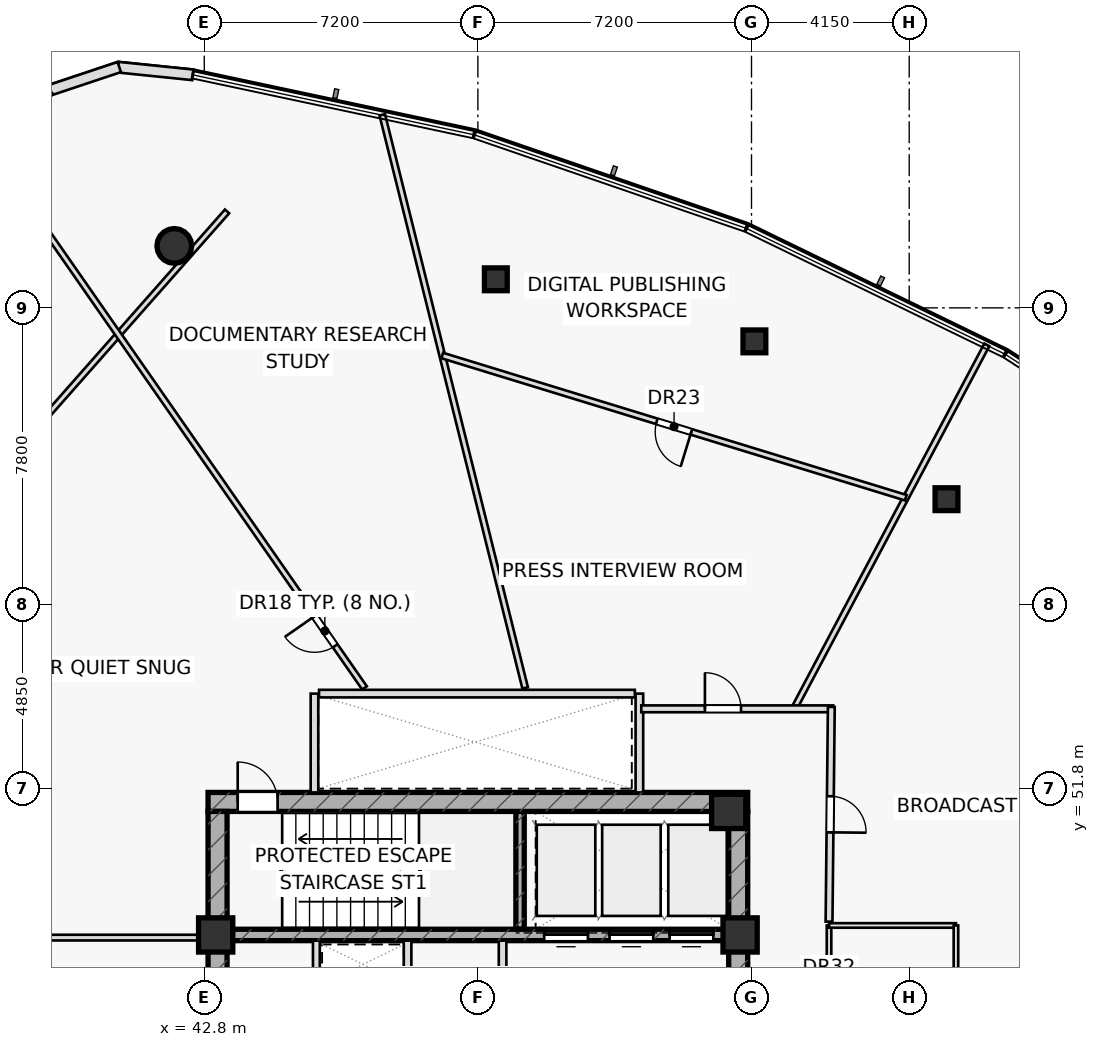
"""IFC4 building model, lengths in metres.
Left out: names, types, materials, properties, quantities, classifications, styles, units other than length and angle.
Written with IfcOpenShell. Run it as: python <this file> out.ifc"""

import sys

from ifc_helpers import new_model, si_unit, direction, frame, frame_2d, origin, origin_2d, place, context, subcontext, project, spatial, rectangle, hollow_rectangle, hollow_circle, extrude, element, fill, save


model = new_model("IFC4")
c1 = context("Model", 3, precision=1e-05, world=origin(), true_north=direction((0.0, 1.0)))
c2 = subcontext(c1, "Body", "Model", "MODEL_VIEW")
j1 = project(units=[si_unit("LENGTHUNIT", "METRE"), si_unit("PLANEANGLEUNIT", "RADIAN")], contexts=[c1])
p1 = place(None, origin())
s1 = spatial("IfcSite", under=j1, at=p1, CompositionType="ELEMENT")
p2 = place(p1, origin())
s2 = spatial("IfcBuilding", under=s1, at=p2, CompositionType="ELEMENT")
p3 = place(p2, frame((0.0, 0.0, 161.8)))
s3 = spatial("IfcBuildingStorey", under=s2, at=p3, CompositionType="ELEMENT", Elevation=161.8)
p4 = place(p3, frame((51.11, 48.1, 0.0), z_axis=(0.0, 0.0, 1.0), x_axis=(0.0, 1.0, 0.0)))
e1 = element("IfcWall", 1, at=p4, inside=s3, PredefinedType="SHEAR", context=c2, shape_type="SweptSolid", body=[
    extrude(rectangle(XDim=3.1, YDim=0.22, at=frame_2d((1.55, 0.0))), origin(), (0.0, 0.0, 1.0), 3.55),
])
p5 = place(p3, frame((42.9, 51.45, 0.0), z_axis=(0.0, 0.0, 1.0), x_axis=(1.0, 0.0, 0.0)))
e2 = element("IfcWall", 2, at=p5, inside=s3, PredefinedType="SHEAR", context=c2, shape_type="SweptSolid", body=[
    extrude(rectangle(XDim=14.2, YDim=0.5, at=frame_2d((7.1, 0.0))), origin(), (0.0, 0.0, 1.0), 3.55),
])
p6 = place(p5, frame((0.78, 0.0, 0.0)))
e3 = element("IfcOpeningElement", 3, at=p6, cuts=e2, PredefinedType="OPENING", context=c2, shape_type="SweptSolid", body=[
    extrude(rectangle(XDim=1.05, YDim=2.2, at=frame_2d((0.525, 1.1))), frame((0.0, 0.26, 0.0), z_axis=(0.0, -1.0, 0.0), x_axis=(1.0, 0.0, 0.0)), (0.0, 0.0, 1.0), 0.52),
])
p7 = place(p3, frame((43.15, 38.8, 0.0), z_axis=(0.0, 0.0, 1.0), x_axis=(0.0, 1.0, 0.0)))
e4 = element("IfcWall", 4, at=p7, inside=s3, PredefinedType="SHEAR", context=c2, shape_type="SweptSolid", body=[
    extrude(rectangle(XDim=12.4, YDim=0.5, at=frame_2d((6.2, 0.0))), origin(), (0.0, 0.0, 1.0), 3.55),
])
p8 = place(p3, frame((56.85, 38.8, 0.0), z_axis=(0.0, 0.0, 1.0), x_axis=(0.0, 1.0, 0.0)))
e5 = element("IfcWall", 5, at=p8, inside=s3, PredefinedType="SHEAR", context=c2, shape_type="SweptSolid", body=[
    extrude(rectangle(XDim=12.4, YDim=0.5, at=frame_2d((6.2, 0.0))), origin(), (0.0, 0.0, 1.0), 3.55),
])
p9 = place(p8, frame((3.85, 0.0, 0.0)))
e6 = element("IfcOpeningElement", 6, at=p9, cuts=e5, PredefinedType="OPENING", context=c2, shape_type="SweptSolid", body=[
    extrude(rectangle(XDim=1.5, YDim=2.2, at=frame_2d((0.75, 1.1))), frame((0.0, 0.26, 0.0), z_axis=(0.0, -1.0, 0.0), x_axis=(1.0, 0.0, 0.0)), (0.0, 0.0, 1.0), 0.52),
])
p10 = place(p3, frame((43.4, 47.95, 0.0), z_axis=(0.0, 0.0, 1.0), x_axis=(1.0, 0.0, 0.0)))
e7 = element("IfcWall", 7, at=p10, inside=s3, PredefinedType="SHEAR", context=c2, shape_type="SweptSolid", body=[
    extrude(rectangle(XDim=13.2, YDim=0.3, at=frame_2d((6.6, 0.0))), origin(), (0.0, 0.0, 1.0), 3.55),
])
p11 = place(p10, frame((8.345, 0.0, 0.0)))
e8 = element("IfcOpeningElement", 8, at=p11, cuts=e7, PredefinedType="OPENING", context=c2, shape_type="SweptSolid", body=[
    extrude(rectangle(XDim=1.15, YDim=2.2, at=frame_2d((0.575, 1.1))), frame((0.0, 0.16, 0.0), z_axis=(0.0, -1.0, 0.0), x_axis=(1.0, 0.0, 0.0)), (0.0, 0.0, 1.0), 0.32),
])
p12 = place(p10, frame((10.065, 0.0, 0.0)))
e9 = element("IfcOpeningElement", 9, at=p12, cuts=e7, PredefinedType="OPENING", context=c2, shape_type="SweptSolid", body=[
    extrude(rectangle(XDim=1.15, YDim=2.2, at=frame_2d((0.575, 1.1))), frame((0.0, 0.16, 0.0), z_axis=(0.0, -1.0, 0.0), x_axis=(1.0, 0.0, 0.0)), (0.0, 0.0, 1.0), 0.32),
])
p13 = place(p10, frame((11.645, 0.0, 0.0)))
e10 = element("IfcOpeningElement", 10, at=p13, cuts=e7, PredefinedType="OPENING", context=c2, shape_type="SweptSolid", body=[
    extrude(rectangle(XDim=1.15, YDim=2.2, at=frame_2d((0.575, 1.1))), frame((0.0, 0.16, 0.0), z_axis=(0.0, -1.0, 0.0), x_axis=(1.0, 0.0, 0.0)), (0.0, 0.0, 1.0), 0.32),
])
for number, where, z_axis, x_axis in (
    (11, (43.1, 47.95, 0.0), (0.0, 0.0, 1.0), (1.0, 0.0, 0.0)),
    (12, (56.9, 47.95, 0.0), (0.0, 0.0, 1.0), (1.0, 0.0, 0.0)),
    (13, (56.6, 51.2, 0.0), (0.0, 0.0, 1.0), (1.0, 0.0, 0.0)),
):
    element("IfcColumn", number, at=place(p3, frame(where, z_axis=z_axis, x_axis=x_axis)), inside=s3, PredefinedType="COLUMN", context=c2, shape_type="SweptSolid", body=[
        extrude(rectangle(XDim=0.9, YDim=0.9, at=origin_2d()), origin(), (0.0, 0.0, 1.0), 3.55),
    ])
p14 = place(p3, frame((42.011, 66.08, 0.0), z_axis=(0.0, 0.0, 1.0), x_axis=(1.0, 0.0, 0.0)))
e14 = element("IfcColumn", 14, at=p14, inside=s3, PredefinedType="COLUMN", context=c2, shape_type="SweptSolid", body=[
    extrude(hollow_circle(Radius=0.457, WallThickness=0.04, at=origin_2d()), origin(), (0.0, 0.0, 1.0), 3.55),
])
for number, where, z_axis, x_axis in (
    (15, (62.331, 59.416, 0.0), (0.0, 0.0, 1.0), (1.0, 0.0, 0.0)),
    (16, (57.277, 63.568, 0.0), (0.0, 0.0, 1.0), (1.0, 0.0, 0.0)),
    (17, (50.472, 65.202, 0.0), (0.0, 0.0, 1.0), (1.0, 0.0, 0.0)),
):
    element("IfcColumn", number, at=place(p3, frame(where, z_axis=z_axis, x_axis=x_axis)), inside=s3, PredefinedType="COLUMN", context=c2, shape_type="SweptSolid", body=[
        extrude(hollow_rectangle(XDim=0.6, YDim=0.6, WallThickness=0.036, at=origin_2d()), origin(), (0.0, 0.0, 1.0), 3.55),
    ])
for number, where, z_axis, x_axis in (
    (18, (45.7, 51.7, 0.0), (0.0, 0.0, 1.0), (0.0, 1.0, 0.0)),
    (19, (54.25, 51.7, 0.0), (0.0, 0.0, 1.0), (0.0, 1.0, 0.0)),
):
    element("IfcWall", number, at=place(p3, frame(where, z_axis=z_axis, x_axis=x_axis)), inside=s3, PredefinedType="PARTITIONING", context=c2, shape_type="SweptSolid", body=[
        extrude(rectangle(XDim=2.6, YDim=0.2, at=frame_2d((1.3, 0.0))), origin(), (0.0, 0.0, 1.0), 3.55),
    ])
p15 = place(p3, frame((48.15, 46.55, 0.0), z_axis=(0.0, 0.0, 1.0), x_axis=(0.0, 1.0, 0.0)))
e20 = element("IfcWall", 20, at=p15, inside=s3, PredefinedType="PARTITIONING", context=c2, shape_type="SweptSolid", body=[
    extrude(rectangle(XDim=1.25, YDim=0.2, at=frame_2d((0.625, 0.0))), origin(), (0.0, 0.0, 1.0), 3.55),
])
p16 = place(p3, frame((50.65, 45.05, 0.0), z_axis=(0.0, 0.0, 1.0), x_axis=(0.0, 1.0, 0.0)))
e21 = element("IfcWall", 21, at=p16, inside=s3, PredefinedType="PARTITIONING", context=c2, shape_type="SweptSolid", body=[
    extrude(rectangle(XDim=2.75, YDim=0.2, at=frame_2d((1.375, 0.0))), origin(), (0.0, 0.0, 1.0), 3.55),
])
p17 = place(p3, frame((45.75, 42.2, 0.0), z_axis=(0.0, 0.0, 1.0), x_axis=(0.0, 1.0, 0.0)))
e22 = element("IfcWall", 22, at=p17, inside=s3, PredefinedType="PARTITIONING", context=c2, shape_type="SweptSolid", body=[
    extrude(rectangle(XDim=5.6, YDim=0.18, at=frame_2d((2.8, 0.0))), origin(), (0.0, 0.0, 1.0), 3.55),
])
p18 = place(p17, frame((0.42, 0.0, 0.0)))
e23 = element("IfcOpeningElement", 23, at=p18, cuts=e22, PredefinedType="OPENING", context=c2, shape_type="SweptSolid", body=[
    extrude(rectangle(XDim=0.85, YDim=2.05, at=frame_2d((0.425, 1.025))), frame((0.0, 0.1, 0.0), z_axis=(0.0, -1.0, 0.0), x_axis=(1.0, 0.0, 0.0)), (0.0, 0.0, 1.0), 0.2),
])
p19 = place(p17, frame((1.57, 0.0, 0.0)))
e24 = element("IfcOpeningElement", 24, at=p19, cuts=e22, PredefinedType="OPENING", context=c2, shape_type="SweptSolid", body=[
    extrude(rectangle(XDim=0.85, YDim=2.05, at=frame_2d((0.425, 1.025))), frame((0.0, 0.1, 0.0), z_axis=(0.0, -1.0, 0.0), x_axis=(1.0, 0.0, 0.0)), (0.0, 0.0, 1.0), 0.2),
])
p20 = place(p17, frame((2.8, 0.0, 0.0)))
e25 = element("IfcOpeningElement", 25, at=p20, cuts=e22, PredefinedType="OPENING", context=c2, shape_type="SweptSolid", body=[
    extrude(rectangle(XDim=0.9, YDim=2.05, at=frame_2d((0.45, 1.025))), frame((0.0, 0.1, 0.0), z_axis=(0.0, -1.0, 0.0), x_axis=(1.0, 0.0, 0.0)), (0.0, 0.0, 1.0), 0.2),
])
p21 = place(p3, frame((43.4, 66.989, 0.0), z_axis=(0.0, 0.0, 1.0), x_axis=(-0.661622343701, -0.749837231881, 0.0)))
e26 = element("IfcWall", 26, at=p21, inside=s3, PredefinedType="PARTITIONING", context=c2, shape_type="SweptSolid", body=[
    extrude(rectangle(XDim=11.427, YDim=0.15, at=frame_2d((5.714, 0.0))), origin(), (0.0, 0.0, 1.0), 2.935),
])
p22 = place(p3, frame((37.14, 47.88, 0.0), z_axis=(0.0, 0.0, 1.0), x_axis=(1.0, 0.0, 0.0)))
e27 = element("IfcWall", 27, at=p22, inside=s3, PredefinedType="PARTITIONING", context=c2, shape_type="SweptSolid", body=[
    extrude(rectangle(XDim=5.76, YDim=0.15, at=frame_2d((2.88, 0.0))), origin(), (0.0, 0.0, 1.0), 2.935),
])
p23 = place(p3, frame((59.24, 41.2, 0.0), z_axis=(0.0, 0.0, 1.0), x_axis=(0.0, 1.0, 0.0)))
e28 = element("IfcWall", 28, at=p23, inside=s3, PredefinedType="PARTITIONING", context=c2, shape_type="SweptSolid", body=[
    extrude(rectangle(XDim=7.0, YDim=0.12, at=frame_2d((3.5, 0.0))), origin(), (0.0, 0.0, 1.0), 3.55),
])
p24 = place(p23, frame((1.15, 0.0, 0.0)))
e29 = element("IfcOpeningElement", 29, at=p24, cuts=e28, PredefinedType="OPENING", context=c2, shape_type="SweptSolid", body=[
    extrude(rectangle(XDim=0.9, YDim=2.05, at=frame_2d((0.45, 1.025))), frame((0.0, 0.07, 0.0), z_axis=(0.0, -1.0, 0.0), x_axis=(1.0, 0.0, 0.0)), (0.0, 0.0, 1.0), 0.14),
])
p25 = place(p23, frame((4.7, 0.0, 0.0)))
e30 = element("IfcOpeningElement", 30, at=p25, cuts=e28, PredefinedType="OPENING", context=c2, shape_type="SweptSolid", body=[
    extrude(rectangle(XDim=0.9, YDim=2.05, at=frame_2d((0.45, 1.025))), frame((0.0, 0.07, 0.0), z_axis=(0.0, -1.0, 0.0), x_axis=(1.0, 0.0, 0.0)), (0.0, 0.0, 1.0), 0.14),
])
p26 = place(p3, frame((59.24, 48.2, 0.0), z_axis=(0.0, 0.0, 1.0), x_axis=(1.0, 0.0, 0.0)))
e31 = element("IfcWall", 31, at=p26, inside=s3, PredefinedType="PARTITIONING", context=c2, shape_type="SweptSolid", body=[
    extrude(rectangle(XDim=3.34, YDim=0.12, at=frame_2d((1.67, 0.0))), origin(), (0.0, 0.0, 1.0), 3.55),
])
p27 = place(p3, frame((62.58, 41.2, 0.0), z_axis=(0.0, 0.0, 1.0), x_axis=(0.0, 1.0, 0.0)))
e32 = element("IfcWall", 32, at=p27, inside=s3, PredefinedType="PARTITIONING", context=c2, shape_type="SweptSolid", body=[
    extrude(rectangle(XDim=7.0, YDim=0.12, at=frame_2d((3.5, 0.0))), origin(), (0.0, 0.0, 1.0), 3.55),
])
p28 = place(p3, frame((51.244, 54.45, 0.0), z_axis=(0.0, 0.0, 1.0), x_axis=(-0.241921992863, 0.970295702025, 0.0)))
e33 = element("IfcWall", 33, at=p28, inside=s3, PredefinedType="PARTITIONING", context=c2, shape_type="SweptSolid", body=[
    extrude(rectangle(XDim=15.541, YDim=0.15, at=frame_2d((7.771, 0.0))), origin(), (0.0, 0.0, 1.0), 3.025),
])
p29 = place(p3, frame((47.017, 54.45, 0.0), z_axis=(0.0, 0.0, 1.0), x_axis=(-0.571606219405, 0.82052807992, 0.0)))
e34 = element("IfcWall", 34, at=p29, inside=s3, PredefinedType="PARTITIONING", context=c2, shape_type="SweptSolid", body=[
    extrude(rectangle(XDim=17.228, YDim=0.15, at=frame_2d((8.614, 0.0))), origin(), (0.0, 0.0, 1.0), 2.935),
])
p30 = place(p29, frame((1.35, 0.0, 0.0)))
e35 = element("IfcOpeningElement", 35, at=p30, cuts=e34, PredefinedType="OPENING", context=c2, shape_type="SweptSolid", body=[
    extrude(rectangle(XDim=0.95, YDim=2.05, at=frame_2d((0.475, 1.025))), frame((0.0, 0.085, 0.0), z_axis=(0.0, -1.0, 0.0), x_axis=(1.0, 0.0, 0.0)), (0.0, 0.0, 1.0), 0.17),
])
p31 = place(p3, frame((62.65, 45.729, 0.0), z_axis=(0.0, 0.0, 1.0), x_axis=(0.99676638327, 0.08035407384, 0.0)))
e36 = element("IfcWall", 36, at=p31, inside=s3, PredefinedType="PARTITIONING", context=c2, shape_type="SweptSolid", body=[
    extrude(rectangle(XDim=19.746, YDim=0.15, at=frame_2d((9.873, 0.0))), origin(), (0.0, 0.0, 1.0), 3.025),
])
p32 = place(p3, frame((58.317, 53.9, 0.0), z_axis=(0.0, 0.0, 1.0), x_axis=(0.468253014178, 0.883594428861, 0.0)))
e37 = element("IfcWall", 37, at=p32, inside=s3, PredefinedType="PARTITIONING", context=c2, shape_type="SweptSolid", body=[
    extrude(rectangle(XDim=10.839, YDim=0.15, at=frame_2d((5.419, 0.0))), origin(), (0.0, 0.0, 1.0), 2.935),
])
p33 = place(p3, frame((61.26, 59.455, 0.0), z_axis=(0.0, 0.0, 1.0), x_axis=(-0.956033107644, 0.293258754496, 0.0)))
e38 = element("IfcWall", 38, at=p33, inside=s3, PredefinedType="PARTITIONING", context=c2, shape_type="SweptSolid", body=[
    extrude(rectangle(XDim=12.758, YDim=0.15, at=frame_2d((6.379, 0.0))), origin(), (0.0, 0.0, 1.0), 2.935),
])
p34 = place(p33, frame((5.904, 0.0, 0.0)))
e39 = element("IfcOpeningElement", 39, at=p34, cuts=e38, PredefinedType="OPENING", context=c2, shape_type="SweptSolid", body=[
    extrude(rectangle(XDim=0.95, YDim=2.05, at=frame_2d((0.475, 1.025))), frame((0.0, 0.085, 0.0), z_axis=(0.0, -1.0, 0.0), x_axis=(1.0, 0.0, 0.0)), (0.0, 0.0, 1.0), 0.17),
])
p35 = place(p3, frame((54.3, 53.9, 0.0), z_axis=(0.0, 0.0, 1.0), x_axis=(1.0, 0.0, 0.0)))
e40 = element("IfcWall", 40, at=p35, inside=s3, PredefinedType="PARTITIONING", context=c2, shape_type="SweptSolid", body=[
    extrude(rectangle(XDim=5.05, YDim=0.18, at=frame_2d((2.525, 0.0))), origin(), (0.0, 0.0, 1.0), 2.935),
])
p36 = place(p35, frame((1.674, 0.0, 0.0)))
e41 = element("IfcOpeningElement", 41, at=p36, cuts=e40, PredefinedType="OPENING", context=c2, shape_type="SweptSolid", body=[
    extrude(rectangle(XDim=0.95, YDim=2.05, at=frame_2d((0.475, 1.025))), frame((0.0, 0.1, 0.0), z_axis=(0.0, -1.0, 0.0), x_axis=(1.0, 0.0, 0.0)), (0.0, 0.0, 1.0), 0.2),
])
p37 = place(p3, frame((59.301, 53.95, 0.0), z_axis=(0.0, 0.0, 1.0), x_axis=(-0.010629422803, -0.99994350609, 0.0)))
e42 = element("IfcWall", 42, at=p37, inside=s3, PredefinedType="PARTITIONING", context=c2, shape_type="SweptSolid", body=[
    extrude(rectangle(XDim=5.65, YDim=0.18, at=frame_2d((2.825, 0.0))), origin(), (0.0, 0.0, 1.0), 2.935),
])
p38 = place(p37, frame((2.35, 0.0, 0.0)))
e43 = element("IfcOpeningElement", 43, at=p38, cuts=e42, PredefinedType="OPENING", context=c2, shape_type="SweptSolid", body=[
    extrude(rectangle(XDim=0.95, YDim=2.05, at=frame_2d((0.475, 1.025))), frame((0.0, 0.1, 0.0), z_axis=(0.0, -1.0, 0.0), x_axis=(1.0, 0.0, 0.0)), (0.0, 0.0, 1.0), 0.2),
])
p39 = place(p3, frame((42.499, 70.582, 0.0), z_axis=(0.0, 0.0, 1.0), x_axis=(-0.994786905794, 0.101975546382, 0.0)))
e44 = element("IfcWall", 44, at=p39, inside=s3, PredefinedType="STANDARD", context=c2, shape_type="SweptSolid", body=[
    extrude(rectangle(XDim=1.975, YDim=0.28, at=frame_2d((0.988, 0.0))), origin(), (0.0, 0.0, 1.0), 3.55),
])
p40 = place(p3, frame((40.563, 70.786, 0.0), z_axis=(0.0, 0.0, 1.0), x_axis=(-0.948571334837, -0.316563457661, 0.0)))
e45 = element("IfcWall", 45, at=p40, inside=s3, PredefinedType="STANDARD", context=c2, shape_type="SweptSolid", body=[
    extrude(rectangle(XDim=1.964, YDim=0.28, at=frame_2d((0.982, 0.0))), origin(), (0.0, 0.0, 1.0), 3.55),
])
p41 = place(p3, frame((38.726, 70.179, 0.0), z_axis=(0.0, 0.0, 1.0), x_axis=(-0.734350414117, -0.678770557174, 0.0)))
e46 = element("IfcWall", 46, at=p41, inside=s3, PredefinedType="STANDARD", context=c2, shape_type="SweptSolid", body=[
    extrude(rectangle(XDim=1.963, YDim=0.28, at=frame_2d((0.982, 0.0))), origin(), (0.0, 0.0, 1.0), 3.55),
])
p42 = place(p3, frame((45.82, 54.3, 0.0), z_axis=(0.0, 0.0, 1.0), x_axis=(1.0, 0.0, 0.0)))
e47 = element("IfcWall", 47, at=p42, inside=s3, PredefinedType="PARTITIONING", context=c2, shape_type="SweptSolid", body=[
    extrude(rectangle(XDim=8.31, YDim=0.2, at=frame_2d((4.155, 0.0))), origin(), (0.0, 0.0, 1.0), 3.55),
])
p43 = place(p6, origin())
e48 = element("IfcDoor", 48, at=p43, inside=s3, OperationType="SINGLE_SWING_LEFT", PredefinedType="DOOR", context=c2, shape_type="SweptSolid", body=[
    extrude(rectangle(XDim=1.05, YDim=2.2, at=frame_2d((0.525, 1.1))), frame((0.0, 0.025, 0.0), z_axis=(0.0, -1.0, 0.0), x_axis=(1.0, 0.0, 0.0)), (0.0, 0.0, 1.0), 0.05),
])
fill(e3, e48)
p44 = place(p30, origin())
e49 = element("IfcDoor", 49, at=p44, inside=s3, OperationType="SINGLE_SWING_RIGHT", PredefinedType="DOOR", context=c2, shape_type="SweptSolid", body=[
    extrude(rectangle(XDim=0.95, YDim=2.05, at=frame_2d((0.475, 1.025))), frame((0.0, 0.025, 0.0), z_axis=(0.0, -1.0, 0.0), x_axis=(1.0, 0.0, 0.0)), (0.0, 0.0, 1.0), 0.05),
])
fill(e35, e49)
p45 = place(p34, origin())
e50 = element("IfcDoor", 50, at=p45, inside=s3, OperationType="SINGLE_SWING_LEFT", PredefinedType="DOOR", context=c2, shape_type="SweptSolid", body=[
    extrude(rectangle(XDim=0.95, YDim=2.05, at=frame_2d((0.475, 1.025))), frame((0.0, 0.025, 0.0), z_axis=(0.0, -1.0, 0.0), x_axis=(1.0, 0.0, 0.0)), (0.0, 0.0, 1.0), 0.05),
])
fill(e39, e50)
p46 = place(p36, origin())
e51 = element("IfcDoor", 51, at=p46, inside=s3, OperationType="SINGLE_SWING_LEFT", PredefinedType="DOOR", context=c2, shape_type="SweptSolid", body=[
    extrude(rectangle(XDim=0.95, YDim=2.05, at=frame_2d((0.475, 1.025))), frame((0.0, 0.025, 0.0), z_axis=(0.0, -1.0, 0.0), x_axis=(1.0, 0.0, 0.0)), (0.0, 0.0, 1.0), 0.05),
])
fill(e41, e51)
p47 = place(p38, origin())
e52 = element("IfcDoor", 52, at=p47, inside=s3, OperationType="SINGLE_SWING_RIGHT", PredefinedType="DOOR", context=c2, shape_type="SweptSolid", body=[
    extrude(rectangle(XDim=0.95, YDim=2.05, at=frame_2d((0.475, 1.025))), frame((0.0, 0.025, 0.0), z_axis=(0.0, -1.0, 0.0), x_axis=(1.0, 0.0, 0.0)), (0.0, 0.0, 1.0), 0.05),
])
fill(e43, e52)
p48 = place(p11, origin())
e53 = element("IfcDoor", 53, at=p48, inside=s3, OperationType="SLIDING_TO_LEFT", PredefinedType="DOOR", context=c2, shape_type="SweptSolid", body=[
    extrude(rectangle(XDim=1.15, YDim=2.2, at=frame_2d((0.575, 1.1))), frame((0.0, 0.025, 0.0), z_axis=(0.0, -1.0, 0.0), x_axis=(1.0, 0.0, 0.0)), (0.0, 0.0, 1.0), 0.05),
])
fill(e8, e53)
p49 = place(p12, origin())
e54 = element("IfcDoor", 54, at=p49, inside=s3, OperationType="SLIDING_TO_LEFT", PredefinedType="DOOR", context=c2, shape_type="SweptSolid", body=[
    extrude(rectangle(XDim=1.15, YDim=2.2, at=frame_2d((0.575, 1.1))), frame((0.0, 0.025, 0.0), z_axis=(0.0, -1.0, 0.0), x_axis=(1.0, 0.0, 0.0)), (0.0, 0.0, 1.0), 0.05),
])
fill(e9, e54)
p50 = place(p13, origin())
e55 = element("IfcDoor", 55, at=p50, inside=s3, OperationType="SLIDING_TO_LEFT", PredefinedType="DOOR", context=c2, shape_type="SweptSolid", body=[
    extrude(rectangle(XDim=1.15, YDim=2.2, at=frame_2d((0.575, 1.1))), frame((0.0, 0.025, 0.0), z_axis=(0.0, -1.0, 0.0), x_axis=(1.0, 0.0, 0.0)), (0.0, 0.0, 1.0), 0.05),
])
fill(e10, e55)
save(model, sys.argv[1])
